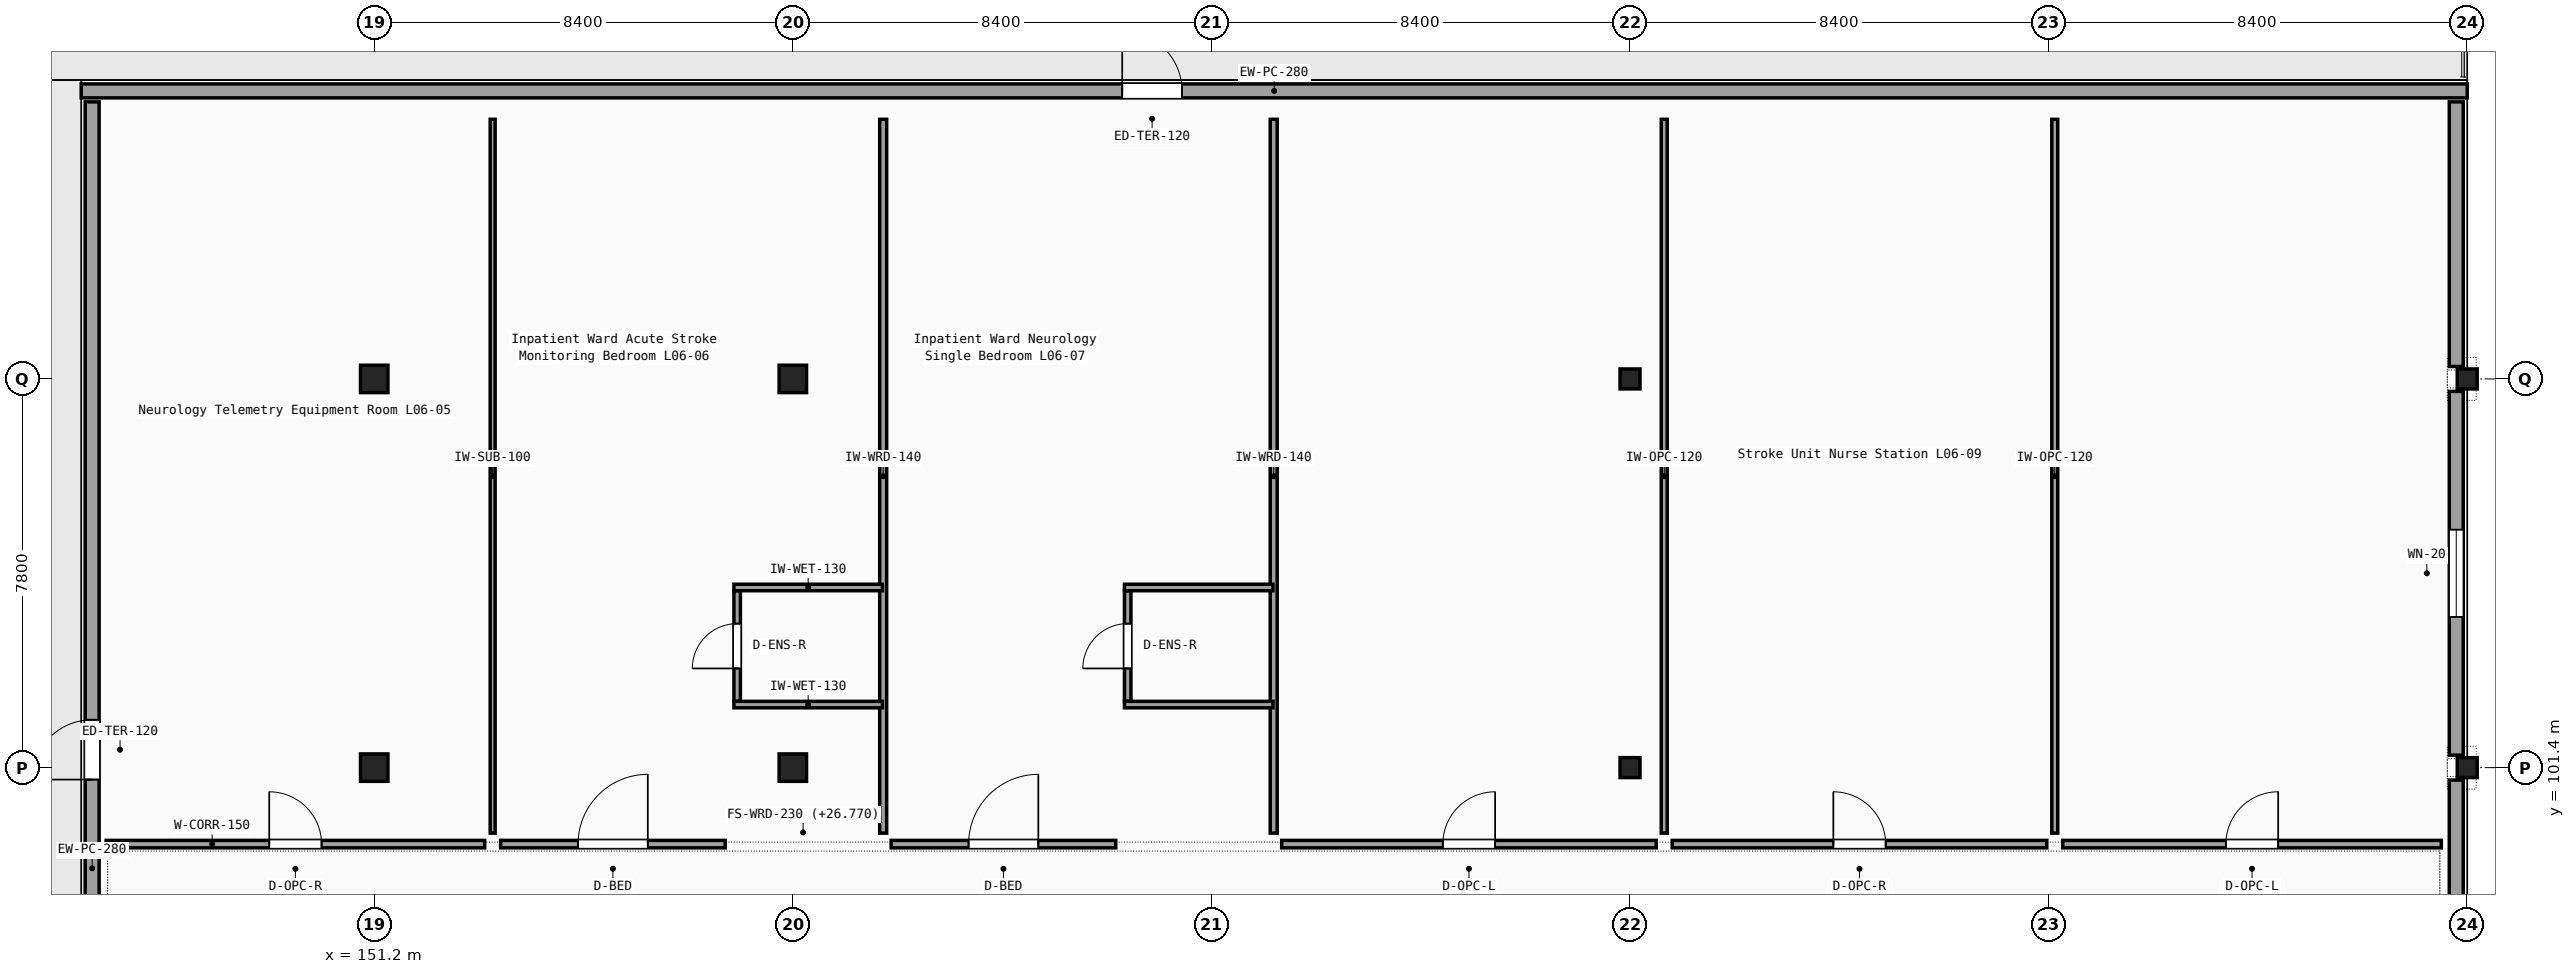
"""IFC4 building model, lengths in metres.
Left out: names, types, materials, properties, quantities, classifications, styles, units other than length and angle.
Written with IfcOpenShell. Run it as: python <this file> out.ifc"""

import sys

from ifc_helpers import new_model, si_unit, direction, frame, frame_2d, origin, origin_2d, place, context, subcontext, project, spatial, rectangle, i_section, extrude, element, fill, save


model = new_model("IFC4")
c1 = context("Model", 3, precision=1e-05, world=origin(), true_north=direction((0.0, 1.0)))
c2 = subcontext(c1, "Body", "Model", "MODEL_VIEW")
j1 = project(units=[si_unit("LENGTHUNIT", "METRE"), si_unit("PLANEANGLEUNIT", "RADIAN")], contexts=[c1])
p1 = place(None, origin())
s1 = spatial("IfcSite", under=j1, at=p1, CompositionType="ELEMENT")
p2 = place(p1, origin())
s2 = spatial("IfcBuilding", under=s1, at=p2, CompositionType="ELEMENT")
p3 = place(p2, frame((0.0, 0.0, 27.0)))
s3 = spatial("IfcBuildingStorey", under=s2, at=p3, CompositionType="ELEMENT", Elevation=27.0)
for number, where, z_axis, x_axis in (
    (1, (151.2, 101.4, 0.0), (0.0, 0.0, 1.0), (1.0, 0.0, 0.0)),
    (2, (151.2, 109.2, 0.0), (0.0, 0.0, 1.0), (1.0, 0.0, 0.0)),
    (3, (159.6, 101.4, 0.0), (0.0, 0.0, 1.0), (1.0, 0.0, 0.0)),
    (4, (159.6, 109.2, 0.0), (0.0, 0.0, 1.0), (1.0, 0.0, 0.0)),
):
    element("IfcColumn", number, at=place(p3, frame(where, z_axis=z_axis, x_axis=x_axis)), inside=s3, PredefinedType="COLUMN", context=c2, shape_type="SweptSolid", body=[
        extrude(rectangle(XDim=0.55, YDim=0.55, at=origin_2d()), origin(), (0.0, 0.0, 1.0), 4.05),
    ])
for number, where, z_axis, x_axis in (
    (5, (176.4, 101.4, 0.0), (0.0, 0.0, 1.0), (1.0, 0.0, 0.0)),
    (6, (176.4, 109.2, 0.0), (0.0, 0.0, 1.0), (1.0, 0.0, 0.0)),
    (7, (193.2, 101.4, 0.0), (0.0, 0.0, 1.0), (1.0, 0.0, 0.0)),
    (8, (193.2, 109.2, 0.0), (0.0, 0.0, 1.0), (1.0, 0.0, 0.0)),
):
    element("IfcColumn", number, at=place(p3, frame(where, z_axis=z_axis, x_axis=x_axis)), inside=s3, PredefinedType="COLUMN", context=c2, shape_type="SweptSolid", body=[
        extrude(i_section(OverallWidth=0.3, OverallDepth=0.4, WebThickness=0.013, FlangeThickness=0.024, FilletRadius=0.027, at=origin_2d()), origin(), (0.0, 0.0, 1.0), 4.05),
    ])
p4 = place(p3, frame((145.54, 39.56, 0.0), z_axis=(0.0, 0.0, 1.0), x_axis=(0.0, 1.0, 0.0)))
e9 = element("IfcWall", 9, at=p4, inside=s3, PredefinedType="SOLIDWALL", context=c2, shape_type="SweptSolid", body=[
    extrude(rectangle(XDim=75.2, YDim=0.28, at=frame_2d((37.6, 0.0))), origin(), (0.0, 0.0, 1.0), 3.77),
])
p5 = place(p4, frame((22.15, 0.0, 0.0)))
e10 = element("IfcOpeningElement", 10, at=p5, cuts=e9, PredefinedType="OPENING", context=c2, shape_type="SweptSolid", body=[
    extrude(rectangle(XDim=1.5, YDim=2.2, at=frame_2d((0.75, 1.1))), frame((0.0, 0.15, 0.0), z_axis=(0.0, -1.0, 0.0), x_axis=(1.0, 0.0, 0.0)), (0.0, 0.0, 1.0), 0.3),
])
p6 = place(p4, frame((61.6, 0.0, 0.0)))
e11 = element("IfcOpeningElement", 11, at=p6, cuts=e9, PredefinedType="OPENING", context=c2, shape_type="SweptSolid", body=[
    extrude(rectangle(XDim=1.2, YDim=2.2, at=frame_2d((0.6, 1.1))), frame((0.0, 0.15, 0.0), z_axis=(0.0, -1.0, 0.0), x_axis=(1.0, 0.0, 0.0)), (0.0, 0.0, 1.0), 0.3),
])
p7 = place(p3, frame((145.32, 114.98, 0.0), z_axis=(0.0, 0.0, 1.0), x_axis=(1.0, 0.0, 0.0)))
e12 = element("IfcWall", 12, at=p7, inside=s3, PredefinedType="SOLIDWALL", context=c2, shape_type="SweptSolid", body=[
    extrude(rectangle(XDim=47.88, YDim=0.28, at=frame_2d((23.94, 0.0))), origin(), (0.0, 0.0, 1.0), 3.77),
])
p8 = place(p7, frame((20.89, 0.0, 0.0)))
e13 = element("IfcOpeningElement", 13, at=p8, cuts=e12, PredefinedType="OPENING", context=c2, shape_type="SweptSolid", body=[
    extrude(rectangle(XDim=1.2, YDim=2.2, at=frame_2d((0.6, 1.1))), frame((0.0, 0.15, 0.0), z_axis=(0.0, -1.0, 0.0), x_axis=(1.0, 0.0, 0.0)), (0.0, 0.0, 1.0), 0.3),
])
p9 = place(p3, frame((192.98, 93.85, 0.0), z_axis=(0.0, 0.0, 1.0), x_axis=(0.0, 1.0, 0.0)))
e14 = element("IfcWall", 14, at=p9, inside=s3, PredefinedType="SOLIDWALL", context=c2, shape_type="SweptSolid", body=[
    extrude(rectangle(XDim=7.3, YDim=0.28, at=frame_2d((3.65, 0.0))), origin(), (0.0, 0.0, 1.0), 3.26),
])
p10 = place(p3, frame((192.98, 101.65, 0.0), z_axis=(0.0, 0.0, 1.0), x_axis=(0.0, 1.0, 0.0)))
e15 = element("IfcWall", 15, at=p10, inside=s3, PredefinedType="SOLIDWALL", context=c2, shape_type="SweptSolid", body=[
    extrude(rectangle(XDim=7.3, YDim=0.28, at=frame_2d((3.65, 0.0))), origin(), (0.0, 0.0, 1.0), 3.26),
])
p11 = place(p10, frame((2.775, 0.0, 0.75)))
e16 = element("IfcOpeningElement", 16, at=p11, cuts=e15, PredefinedType="OPENING", context=c2, shape_type="SweptSolid", body=[
    extrude(rectangle(XDim=1.75, YDim=1.9, at=frame_2d((0.875, 0.95))), frame((0.0, 0.15, 0.0), z_axis=(0.0, -1.0, 0.0), x_axis=(1.0, 0.0, 0.0)), (0.0, 0.0, 1.0), 0.3),
])
p12 = place(p3, frame((192.98, 109.45, 0.0), z_axis=(0.0, 0.0, 1.0), x_axis=(0.0, 1.0, 0.0)))
e17 = element("IfcWall", 17, at=p12, inside=s3, PredefinedType="SOLIDWALL", context=c2, shape_type="SweptSolid", body=[
    extrude(rectangle(XDim=5.31, YDim=0.28, at=frame_2d((2.655, 0.0))), origin(), (0.0, 0.0, 1.0), 3.26),
])
p13 = place(p3, frame((145.82, 99.865, 0.0), z_axis=(0.0, 0.0, 1.0), x_axis=(1.0, 0.0, 0.0)))
e18 = element("IfcWall", 18, at=p13, inside=s3, PredefinedType="PARTITIONING", context=c2, shape_type="SweptSolid", body=[
    extrude(rectangle(XDim=7.597, YDim=0.15, at=frame_2d((3.798, 0.0))), origin(), (0.0, 0.0, 1.0), 3.53),
])
p14 = place(p13, frame((3.273, 0.0, 0.0)))
e19 = element("IfcOpeningElement", 19, at=p14, cuts=e18, PredefinedType="OPENING", context=c2, shape_type="SweptSolid", body=[
    extrude(rectangle(XDim=1.05, YDim=2.15, at=frame_2d((0.525, 1.075))), frame((0.0, 0.085, 0.0), z_axis=(0.0, -1.0, 0.0), x_axis=(1.0, 0.0, 0.0)), (0.0, 0.0, 1.0), 0.17),
])
p15 = place(p3, frame((153.577, 100.085, 0.0), z_axis=(0.0, 0.0, 1.0), x_axis=(0.0, 1.0, 0.0)))
e20 = element("IfcWall", 20, at=p15, inside=s3, PredefinedType="PARTITIONING", context=c2, shape_type="SweptSolid", body=[
    extrude(rectangle(XDim=14.325, YDim=0.1, at=frame_2d((7.163, 0.0))), origin(), (0.0, 0.0, 1.0), 3.26),
])
p16 = place(p3, frame((153.737, 99.865, 0.0), z_axis=(0.0, 0.0, 1.0), x_axis=(1.0, 0.0, 0.0)))
e21 = element("IfcWall", 21, at=p16, inside=s3, PredefinedType="PARTITIONING", context=c2, shape_type="SweptSolid", body=[
    extrude(rectangle(XDim=4.507, YDim=0.15, at=frame_2d((2.253, 0.0))), origin(), (0.0, 0.0, 1.0), 3.77),
])
p17 = place(p16, frame((1.553, 0.0, 0.0)))
e22 = element("IfcOpeningElement", 22, at=p17, cuts=e21, PredefinedType="OPENING", context=c2, shape_type="SweptSolid", body=[
    extrude(rectangle(XDim=1.4, YDim=2.2, at=frame_2d((0.7, 1.1))), frame((0.0, 0.085, 0.0), z_axis=(0.0, -1.0, 0.0), x_axis=(1.0, 0.0, 0.0)), (0.0, 0.0, 1.0), 0.17),
])
p18 = place(p3, frame((161.413, 100.085, 0.0), z_axis=(0.0, 0.0, 1.0), x_axis=(0.0, 1.0, 0.0)))
e23 = element("IfcWall", 23, at=p18, inside=s3, PredefinedType="PARTITIONING", context=c2, shape_type="SweptSolid", body=[
    extrude(rectangle(XDim=14.325, YDim=0.14, at=frame_2d((7.163, 0.0))), origin(), (0.0, 0.0, 1.0), 3.26),
])
p19 = place(p3, frame((158.483, 102.73, 0.0), z_axis=(0.0, 0.0, 1.0), x_axis=(0.0, 1.0, 0.0)))
e24 = element("IfcWall", 24, at=p19, inside=s3, PredefinedType="PARTITIONING", context=c2, shape_type="SweptSolid", body=[
    extrude(rectangle(XDim=2.22, YDim=0.13, at=frame_2d((1.11, 0.0))), origin(), (0.0, 0.0, 1.0), 3.77),
])
p20 = place(p19, frame((0.66, 0.0, 0.0)))
e25 = element("IfcOpeningElement", 25, at=p20, cuts=e24, PredefinedType="OPENING", context=c2, shape_type="SweptSolid", body=[
    extrude(rectangle(XDim=0.9, YDim=2.1, at=frame_2d((0.45, 1.05))), frame((0.0, 0.075, 0.0), z_axis=(0.0, -1.0, 0.0), x_axis=(1.0, 0.0, 0.0)), (0.0, 0.0, 1.0), 0.15),
])
for number, where, z_axis, x_axis in (
    (26, (158.418, 102.665, 0.0), (0.0, 0.0, 1.0), (1.0, 0.0, 0.0)),
    (27, (158.418, 105.015, 0.0), (0.0, 0.0, 1.0), (1.0, 0.0, 0.0)),
):
    element("IfcWall", number, at=place(p3, frame(where, z_axis=z_axis, x_axis=x_axis)), inside=s3, PredefinedType="PARTITIONING", context=c2, shape_type="SweptSolid", body=[
        extrude(rectangle(XDim=2.98, YDim=0.13, at=frame_2d((1.49, 0.0))), origin(), (0.0, 0.0, 1.0), 3.54),
    ])
p21 = place(p3, frame((161.573, 99.865, 0.0), z_axis=(0.0, 0.0, 1.0), x_axis=(1.0, 0.0, 0.0)))
e28 = element("IfcWall", 28, at=p21, inside=s3, PredefinedType="PARTITIONING", context=c2, shape_type="SweptSolid", body=[
    extrude(rectangle(XDim=4.507, YDim=0.15, at=frame_2d((2.253, 0.0))), origin(), (0.0, 0.0, 1.0), 3.77),
])
p22 = place(p21, frame((1.553, 0.0, 0.0)))
e29 = element("IfcOpeningElement", 29, at=p22, cuts=e28, PredefinedType="OPENING", context=c2, shape_type="SweptSolid", body=[
    extrude(rectangle(XDim=1.4, YDim=2.2, at=frame_2d((0.7, 1.1))), frame((0.0, 0.085, 0.0), z_axis=(0.0, -1.0, 0.0), x_axis=(1.0, 0.0, 0.0)), (0.0, 0.0, 1.0), 0.17),
])
p23 = place(p3, frame((169.25, 100.085, 0.0), z_axis=(0.0, 0.0, 1.0), x_axis=(0.0, 1.0, 0.0)))
e30 = element("IfcWall", 30, at=p23, inside=s3, PredefinedType="PARTITIONING", context=c2, shape_type="SweptSolid", body=[
    extrude(rectangle(XDim=14.325, YDim=0.14, at=frame_2d((7.163, 0.0))), origin(), (0.0, 0.0, 1.0), 3.26),
])
p24 = place(p3, frame((166.32, 102.73, 0.0), z_axis=(0.0, 0.0, 1.0), x_axis=(0.0, 1.0, 0.0)))
e31 = element("IfcWall", 31, at=p24, inside=s3, PredefinedType="PARTITIONING", context=c2, shape_type="SweptSolid", body=[
    extrude(rectangle(XDim=2.22, YDim=0.13, at=frame_2d((1.11, 0.0))), origin(), (0.0, 0.0, 1.0), 3.77),
])
p25 = place(p24, frame((0.66, 0.0, 0.0)))
e32 = element("IfcOpeningElement", 32, at=p25, cuts=e31, PredefinedType="OPENING", context=c2, shape_type="SweptSolid", body=[
    extrude(rectangle(XDim=0.9, YDim=2.1, at=frame_2d((0.45, 1.05))), frame((0.0, 0.075, 0.0), z_axis=(0.0, -1.0, 0.0), x_axis=(1.0, 0.0, 0.0)), (0.0, 0.0, 1.0), 0.15),
])
for number, where, z_axis, x_axis in (
    (33, (166.255, 102.665, 0.0), (0.0, 0.0, 1.0), (1.0, 0.0, 0.0)),
    (34, (166.255, 105.015, 0.0), (0.0, 0.0, 1.0), (1.0, 0.0, 0.0)),
):
    element("IfcWall", number, at=place(p3, frame(where, z_axis=z_axis, x_axis=x_axis)), inside=s3, PredefinedType="PARTITIONING", context=c2, shape_type="SweptSolid", body=[
        extrude(rectangle(XDim=2.98, YDim=0.13, at=frame_2d((1.49, 0.0))), origin(), (0.0, 0.0, 1.0), 3.77),
    ])
p26 = place(p3, frame((169.41, 99.865, 0.0), z_axis=(0.0, 0.0, 1.0), x_axis=(1.0, 0.0, 0.0)))
e35 = element("IfcWall", 35, at=p26, inside=s3, PredefinedType="PARTITIONING", context=c2, shape_type="SweptSolid", body=[
    extrude(rectangle(XDim=7.517, YDim=0.15, at=frame_2d((3.758, 0.0))), origin(), (0.0, 0.0, 1.0), 3.54),
])
p27 = place(p26, frame((3.233, 0.0, 0.0)))
e36 = element("IfcOpeningElement", 36, at=p27, cuts=e35, PredefinedType="OPENING", context=c2, shape_type="SweptSolid", body=[
    extrude(rectangle(XDim=1.05, YDim=2.15, at=frame_2d((0.525, 1.075))), frame((0.0, 0.085, 0.0), z_axis=(0.0, -1.0, 0.0), x_axis=(1.0, 0.0, 0.0)), (0.0, 0.0, 1.0), 0.17),
])
p28 = place(p3, frame((177.087, 100.085, 0.0), z_axis=(0.0, 0.0, 1.0), x_axis=(0.0, 1.0, 0.0)))
e37 = element("IfcWall", 37, at=p28, inside=s3, PredefinedType="PARTITIONING", context=c2, shape_type="SweptSolid", body=[
    extrude(rectangle(XDim=14.325, YDim=0.12, at=frame_2d((7.163, 0.0))), origin(), (0.0, 0.0, 1.0), 3.26),
])
p29 = place(p3, frame((177.247, 99.865, 0.0), z_axis=(0.0, 0.0, 1.0), x_axis=(1.0, 0.0, 0.0)))
e38 = element("IfcWall", 38, at=p29, inside=s3, PredefinedType="PARTITIONING", context=c2, shape_type="SweptSolid", body=[
    extrude(rectangle(XDim=7.517, YDim=0.15, at=frame_2d((3.758, 0.0))), origin(), (0.0, 0.0, 1.0), 3.77),
])
p30 = place(p29, frame((3.233, 0.0, 0.0)))
e39 = element("IfcOpeningElement", 39, at=p30, cuts=e38, PredefinedType="OPENING", context=c2, shape_type="SweptSolid", body=[
    extrude(rectangle(XDim=1.05, YDim=2.15, at=frame_2d((0.525, 1.075))), frame((0.0, 0.085, 0.0), z_axis=(0.0, -1.0, 0.0), x_axis=(1.0, 0.0, 0.0)), (0.0, 0.0, 1.0), 0.17),
])
p31 = place(p3, frame((184.923, 100.085, 0.0), z_axis=(0.0, 0.0, 1.0), x_axis=(0.0, 1.0, 0.0)))
e40 = element("IfcWall", 40, at=p31, inside=s3, PredefinedType="PARTITIONING", context=c2, shape_type="SweptSolid", body=[
    extrude(rectangle(XDim=14.325, YDim=0.12, at=frame_2d((7.163, 0.0))), origin(), (0.0, 0.0, 1.0), 3.26),
])
p32 = place(p3, frame((185.083, 99.865, 0.0), z_axis=(0.0, 0.0, 1.0), x_axis=(1.0, 0.0, 0.0)))
e41 = element("IfcWall", 41, at=p32, inside=s3, PredefinedType="PARTITIONING", context=c2, shape_type="SweptSolid", body=[
    extrude(rectangle(XDim=7.597, YDim=0.15, at=frame_2d((3.798, 0.0))), origin(), (0.0, 0.0, 1.0), 3.77),
])
p33 = place(p32, frame((3.273, 0.0, 0.0)))
e42 = element("IfcOpeningElement", 42, at=p33, cuts=e41, PredefinedType="OPENING", context=c2, shape_type="SweptSolid", body=[
    extrude(rectangle(XDim=1.05, YDim=2.15, at=frame_2d((0.525, 1.075))), frame((0.0, 0.085, 0.0), z_axis=(0.0, -1.0, 0.0), x_axis=(1.0, 0.0, 0.0)), (0.0, 0.0, 1.0), 0.17),
])
p34 = place(p6, origin())
e43 = element("IfcDoor", 43, at=p34, inside=s3, OperationType="SINGLE_SWING_LEFT", PredefinedType="DOOR", context=c2, shape_type="SweptSolid", body=[
    extrude(rectangle(XDim=1.2, YDim=2.2, at=frame_2d((0.6, 1.1))), frame((0.0, 0.025, 0.0), z_axis=(0.0, -1.0, 0.0), x_axis=(1.0, 0.0, 0.0)), (0.0, 0.0, 1.0), 0.05),
])
fill(e11, e43)
p35 = place(p8, origin())
e44 = element("IfcDoor", 44, at=p35, inside=s3, OperationType="SINGLE_SWING_LEFT", PredefinedType="DOOR", context=c2, shape_type="SweptSolid", body=[
    extrude(rectangle(XDim=1.2, YDim=2.2, at=frame_2d((0.6, 1.1))), frame((0.0, 0.025, 0.0), z_axis=(0.0, -1.0, 0.0), x_axis=(1.0, 0.0, 0.0)), (0.0, 0.0, 1.0), 0.05),
])
fill(e13, e44)
p36 = place(p11, origin())
e45 = element("IfcWindow", 45, at=p36, inside=s3, PartitioningType="SINGLE_PANEL", PredefinedType="WINDOW", context=c2, shape_type="SweptSolid", body=[
    extrude(rectangle(XDim=1.75, YDim=1.9, at=frame_2d((0.875, 0.95))), frame((0.0, 0.03, 0.0), z_axis=(0.0, -1.0, 0.0), x_axis=(1.0, 0.0, 0.0)), (0.0, 0.0, 1.0), 0.06),
])
fill(e16, e45)
p37 = place(p14, origin())
e46 = element("IfcDoor", 46, at=p37, inside=s3, OperationType="SINGLE_SWING_LEFT", PredefinedType="DOOR", context=c2, shape_type="SweptSolid", body=[
    extrude(rectangle(XDim=1.05, YDim=2.15, at=frame_2d((0.525, 1.075))), frame((0.0, 0.025, 0.0), z_axis=(0.0, -1.0, 0.0), x_axis=(1.0, 0.0, 0.0)), (0.0, 0.0, 1.0), 0.05),
])
fill(e19, e46)
p38 = place(p17, origin())
e47 = element("IfcDoor", 47, at=p38, inside=s3, OperationType="SINGLE_SWING_RIGHT", PredefinedType="DOOR", context=c2, shape_type="SweptSolid", body=[
    extrude(rectangle(XDim=1.4, YDim=2.2, at=frame_2d((0.7, 1.1))), frame((0.0, 0.025, 0.0), z_axis=(0.0, -1.0, 0.0), x_axis=(1.0, 0.0, 0.0)), (0.0, 0.0, 1.0), 0.05),
])
fill(e22, e47)
p39 = place(p20, origin())
e48 = element("IfcDoor", 48, at=p39, inside=s3, OperationType="SINGLE_SWING_LEFT", PredefinedType="DOOR", context=c2, shape_type="SweptSolid", body=[
    extrude(rectangle(XDim=0.9, YDim=2.1, at=frame_2d((0.45, 1.05))), frame((0.0, 0.025, 0.0), z_axis=(0.0, -1.0, 0.0), x_axis=(1.0, 0.0, 0.0)), (0.0, 0.0, 1.0), 0.05),
])
fill(e25, e48)
p40 = place(p22, origin())
e49 = element("IfcDoor", 49, at=p40, inside=s3, OperationType="SINGLE_SWING_RIGHT", PredefinedType="DOOR", context=c2, shape_type="SweptSolid", body=[
    extrude(rectangle(XDim=1.4, YDim=2.2, at=frame_2d((0.7, 1.1))), frame((0.0, 0.025, 0.0), z_axis=(0.0, -1.0, 0.0), x_axis=(1.0, 0.0, 0.0)), (0.0, 0.0, 1.0), 0.05),
])
fill(e29, e49)
p41 = place(p25, origin())
e50 = element("IfcDoor", 50, at=p41, inside=s3, OperationType="SINGLE_SWING_LEFT", PredefinedType="DOOR", context=c2, shape_type="SweptSolid", body=[
    extrude(rectangle(XDim=0.9, YDim=2.1, at=frame_2d((0.45, 1.05))), frame((0.0, 0.025, 0.0), z_axis=(0.0, -1.0, 0.0), x_axis=(1.0, 0.0, 0.0)), (0.0, 0.0, 1.0), 0.05),
])
fill(e32, e50)
p42 = place(p27, origin())
e51 = element("IfcDoor", 51, at=p42, inside=s3, OperationType="SINGLE_SWING_RIGHT", PredefinedType="DOOR", context=c2, shape_type="SweptSolid", body=[
    extrude(rectangle(XDim=1.05, YDim=2.15, at=frame_2d((0.525, 1.075))), frame((0.0, 0.025, 0.0), z_axis=(0.0, -1.0, 0.0), x_axis=(1.0, 0.0, 0.0)), (0.0, 0.0, 1.0), 0.05),
])
fill(e36, e51)
p43 = place(p30, origin())
e52 = element("IfcDoor", 52, at=p43, inside=s3, OperationType="SINGLE_SWING_LEFT", PredefinedType="DOOR", context=c2, shape_type="SweptSolid", body=[
    extrude(rectangle(XDim=1.05, YDim=2.15, at=frame_2d((0.525, 1.075))), frame((0.0, 0.025, 0.0), z_axis=(0.0, -1.0, 0.0), x_axis=(1.0, 0.0, 0.0)), (0.0, 0.0, 1.0), 0.05),
])
fill(e39, e52)
p44 = place(p33, origin())
e53 = element("IfcDoor", 53, at=p44, inside=s3, OperationType="SINGLE_SWING_RIGHT", PredefinedType="DOOR", context=c2, shape_type="SweptSolid", body=[
    extrude(rectangle(XDim=1.05, YDim=2.15, at=frame_2d((0.525, 1.075))), frame((0.0, 0.025, 0.0), z_axis=(0.0, -1.0, 0.0), x_axis=(1.0, 0.0, 0.0)), (0.0, 0.0, 1.0), 0.05),
])
fill(e42, e53)
save(model, sys.argv[1])
